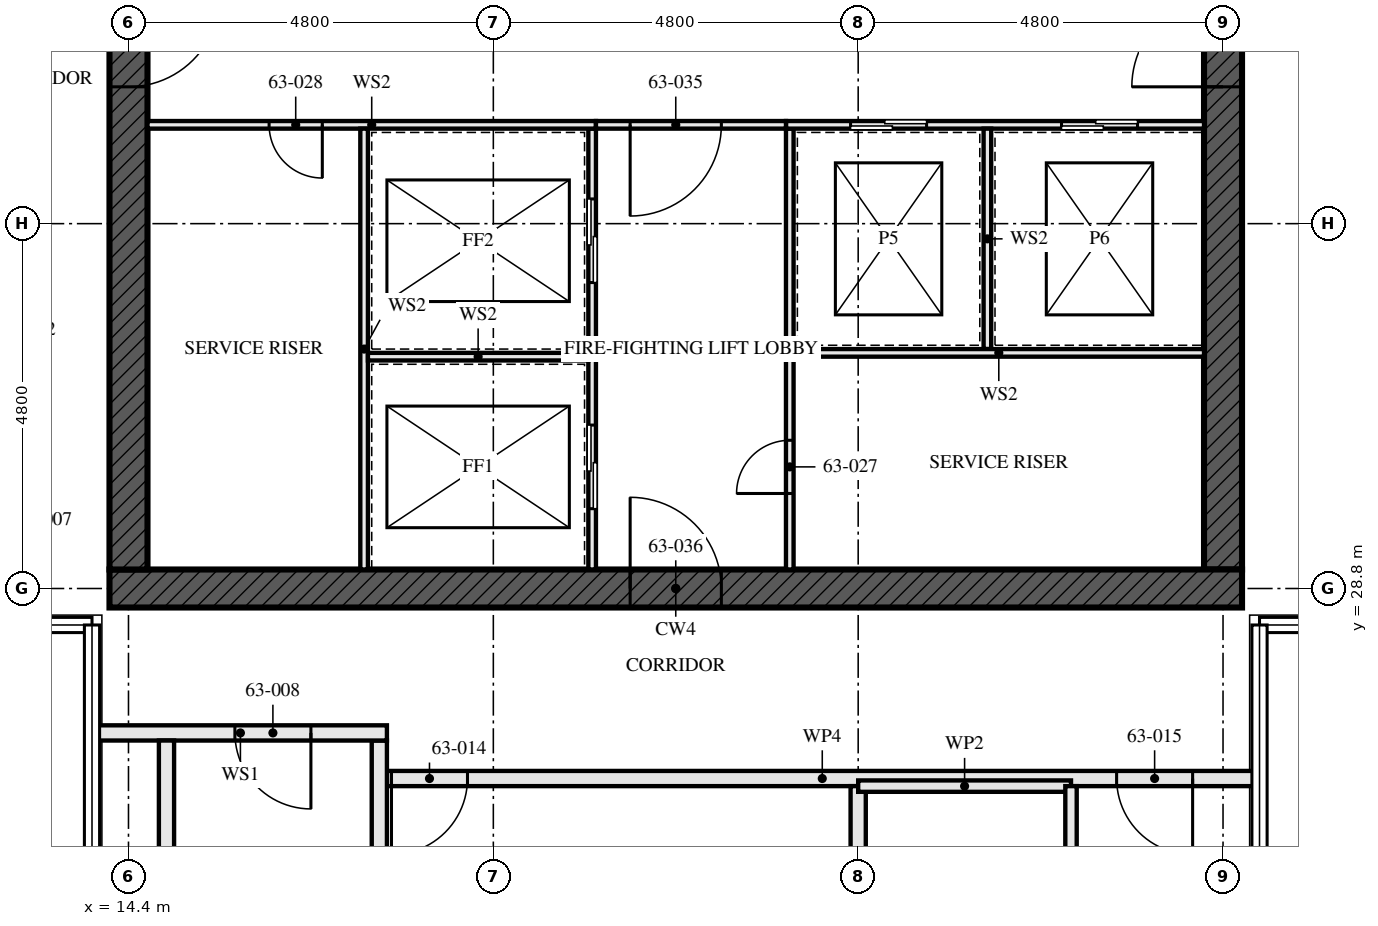
"""IFC4 building model, lengths in metres.
Left out: names, types, materials, properties, quantities, classifications, styles, units other than length and angle.
Written with IfcOpenShell. Run it as: python <this file> out.ifc"""

import sys

from ifc_helpers import new_model, si_unit, direction, frame, frame_2d, origin, place, context, subcontext, project, spatial, rectangle, extrude, element, fill, save


model = new_model("IFC4")
c1 = context("Model", 3, precision=1e-05, world=origin(), true_north=direction((0.0, 1.0)))
c2 = subcontext(c1, "Body", "Model", "MODEL_VIEW")
j1 = project(units=[si_unit("LENGTHUNIT", "METRE"), si_unit("PLANEANGLEUNIT", "RADIAN")], contexts=[c1])
p1 = place(None, origin())
s1 = spatial("IfcSite", under=j1, at=p1, CompositionType="ELEMENT")
p2 = place(p1, origin())
s2 = spatial("IfcBuilding", under=s1, at=p2, CompositionType="ELEMENT")
p3 = place(p2, frame((0.0, 0.0, 229.5)))
s3 = spatial("IfcBuildingStorey", under=s2, at=p3, CompositionType="ELEMENT", Elevation=229.5)
p4 = place(p3, frame((14.15, 28.8, -0.17), z_axis=(0.0, 0.0, 1.0), x_axis=(1.0, 0.0, 0.0)))
e1 = element("IfcWall", 1, at=p4, inside=s3, PredefinedType="SHEAR", context=c2, shape_type="SweptSolid", body=[
    extrude(rectangle(XDim=14.9, YDim=0.5, at=frame_2d((7.45, 0.0))), origin(), (0.0, 0.0, 1.0), 3.5),
])
p5 = place(p4, frame((6.85, 0.0, 0.17)))
e2 = element("IfcOpeningElement", 2, at=p5, cuts=e1, PredefinedType="OPENING", context=c2, shape_type="SweptSolid", body=[
    extrude(rectangle(XDim=1.2, YDim=2.1, at=frame_2d((0.6, 1.05))), frame((0.0, 0.26, 0.0), z_axis=(0.0, -1.0, 0.0), x_axis=(1.0, 0.0, 0.0)), (0.0, 0.0, 1.0), 0.521),
])
p6 = place(p3, frame((14.4, 42.95, -0.17), z_axis=(0.0, 0.0, 1.0), x_axis=(0.0, -1.0, 0.0)))
e3 = element("IfcWall", 3, at=p6, inside=s3, PredefinedType="SHEAR", context=c2, shape_type="SweptSolid", body=[
    extrude(rectangle(XDim=13.9, YDim=0.5, at=frame_2d((6.95, 0.0))), origin(), (0.0, 0.0, 1.0), 3.5),
])
p7 = place(p6, frame((6.35, 0.0, 0.17)))
e4 = element("IfcOpeningElement", 4, at=p7, cuts=e3, PredefinedType="OPENING", context=c2, shape_type="SweptSolid", body=[
    extrude(rectangle(XDim=1.2, YDim=2.1, at=frame_2d((0.6, 1.05))), frame((0.0, 0.26, 0.0), z_axis=(0.0, -1.0, 0.0), x_axis=(1.0, 0.0, 0.0)), (0.0, 0.0, 1.0), 0.521),
])
p8 = place(p3, frame((28.8, 29.05, -0.17), z_axis=(0.0, 0.0, 1.0), x_axis=(0.0, 1.0, 0.0)))
e5 = element("IfcWall", 5, at=p8, inside=s3, PredefinedType="SHEAR", context=c2, shape_type="SweptSolid", body=[
    extrude(rectangle(XDim=13.9, YDim=0.5, at=frame_2d((6.95, 0.0))), origin(), (0.0, 0.0, 1.0), 3.5),
])
p9 = place(p8, frame((6.35, 0.0, 0.17)))
e6 = element("IfcOpeningElement", 6, at=p9, cuts=e5, PredefinedType="OPENING", context=c2, shape_type="SweptSolid", body=[
    extrude(rectangle(XDim=1.2, YDim=2.1, at=frame_2d((0.6, 1.05))), frame((0.0, 0.26, 0.0), z_axis=(0.0, -1.0, 0.0), x_axis=(1.0, 0.0, 0.0)), (0.0, 0.0, 1.0), 0.521),
])
for number, where, z_axis, x_axis in (
    (7, (14.9, 22.1, 0.0), (0.0, 0.0, 1.0), (0.0, 1.0, 0.0)),
    (8, (17.7, 22.1, 0.0), (0.0, 0.0, 1.0), (0.0, 1.0, 0.0)),
):
    element("IfcWall", number, at=place(p3, frame(where, z_axis=z_axis, x_axis=x_axis)), inside=s3, PredefinedType="SOLIDWALL", context=c2, shape_type="SweptSolid", body=[
        extrude(rectangle(XDim=4.7, YDim=0.2, at=frame_2d((2.35, 0.0))), origin(), (0.0, 0.0, 1.0), 2.99),
    ])
p10 = place(p3, frame((13.945, 26.9, 0.0), z_axis=(0.0, 0.0, 1.0), x_axis=(1.0, 0.0, 0.0)))
e9 = element("IfcWall", 9, at=p10, inside=s3, PredefinedType="SOLIDWALL", context=c2, shape_type="SweptSolid", body=[
    extrude(rectangle(XDim=3.855, YDim=0.2, at=frame_2d((1.927, 0.0))), origin(), (0.0, 0.0, 1.0), 2.32),
])
p11 = place(p10, frame((1.855, 0.0, 0.0)))
e10 = element("IfcOpeningElement", 10, at=p11, cuts=e9, PredefinedType="OPENING", context=c2, shape_type="SweptSolid", body=[
    extrude(rectangle(XDim=1.0, YDim=2.1, at=frame_2d((0.5, 1.05))), frame((0.0, 0.111, 0.0), z_axis=(0.0, -1.0, 0.0), x_axis=(1.0, 0.0, 0.0)), (0.0, 0.0, 1.0), 0.221),
])
p12 = place(p3, frame((24.0, 19.52, 0.0), z_axis=(0.0, 0.0, 1.0), x_axis=(0.0, 1.0, 0.0)))
e11 = element("IfcWall", 11, at=p12, inside=s3, PredefinedType="PARTITIONING", context=c2, shape_type="SweptSolid", body=[
    extrude(rectangle(XDim=6.68, YDim=0.2, at=frame_2d((3.34, 0.0))), origin(), (0.0, 0.0, 1.0), 2.55),
])
p13 = place(p3, frame((26.8, 23.2, 0.0), z_axis=(0.0, 0.0, 1.0), x_axis=(0.0, 1.0, 0.0)))
e12 = element("IfcWall", 12, at=p13, inside=s3, PredefinedType="PARTITIONING", context=c2, shape_type="SweptSolid", body=[
    extrude(rectangle(XDim=3.0, YDim=0.15, at=frame_2d((1.5, 0.0))), origin(), (0.0, 0.0, 1.0), 2.55),
])
p14 = place(p13, frame((1.05, 0.0, 0.0)))
e13 = element("IfcOpeningElement", 13, at=p14, cuts=e12, PredefinedType="OPENING", context=c2, shape_type="SweptSolid", body=[
    extrude(rectangle(XDim=0.9, YDim=2.1, at=frame_2d((0.45, 1.05))), frame((0.0, 0.085, 0.0), z_axis=(0.0, -1.0, 0.0), x_axis=(1.0, 0.0, 0.0)), (0.0, 0.0, 1.0), 0.171),
])
p15 = place(p3, frame((24.0, 26.2, 0.0), z_axis=(0.0, 0.0, 1.0), x_axis=(1.0, 0.0, 0.0)))
e14 = element("IfcWall", 14, at=p15, inside=s3, PredefinedType="PARTITIONING", context=c2, shape_type="SweptSolid", body=[
    extrude(rectangle(XDim=2.8, YDim=0.15, at=frame_2d((1.4, 0.0))), origin(), (0.0, 0.0, 1.0), 3.33),
])
p16 = place(p3, frame((17.8, 26.3, 0.0), z_axis=(0.0, 0.0, 1.0), x_axis=(1.0, 0.0, 0.0)))
e15 = element("IfcWall", 15, at=p16, inside=s3, PredefinedType="PARTITIONING", context=c2, shape_type="SweptSolid", body=[
    extrude(rectangle(XDim=11.455, YDim=0.2, at=frame_2d((5.728, 0.0))), origin(), (0.0, 0.0, 1.0), 2.32),
])
p17 = place(p16, frame((0.06, 0.0, 0.0)))
e16 = element("IfcOpeningElement", 16, at=p17, cuts=e15, PredefinedType="OPENING", context=c2, shape_type="SweptSolid", body=[
    extrude(rectangle(XDim=1.0, YDim=2.1, at=frame_2d((0.5, 1.05))), frame((0.0, 0.111, 0.0), z_axis=(0.0, -1.0, 0.0), x_axis=(1.0, 0.0, 0.0)), (0.0, 0.0, 1.0), 0.221),
])
p18 = place(p16, frame((9.6, 0.0, 0.0)))
e17 = element("IfcOpeningElement", 17, at=p18, cuts=e15, PredefinedType="OPENING", context=c2, shape_type="SweptSolid", body=[
    extrude(rectangle(XDim=1.0, YDim=2.1, at=frame_2d((0.5, 1.05))), frame((0.0, 0.111, 0.0), z_axis=(0.0, -1.0, 0.0), x_axis=(1.0, 0.0, 0.0)), (0.0, 0.0, 1.0), 0.221),
])
p19 = place(p3, frame((20.5, 29.05, 0.0), z_axis=(0.0, 0.0, 1.0), x_axis=(0.0, 1.0, 0.0)))
e18 = element("IfcWall", 18, at=p19, inside=s3, PredefinedType="SOLIDWALL", context=c2, shape_type="SweptSolid", body=[
    extrude(rectangle(XDim=5.8, YDim=0.1, at=frame_2d((2.9, 0.0))), origin(), (0.0, 0.0, 1.0), 3.33),
])
p20 = place(p19, frame((0.8, 0.0, 0.0)))
e19 = element("IfcOpeningElement", 19, at=p20, cuts=e18, PredefinedType="OPENING", context=c2, shape_type="SweptSolid", body=[
    extrude(rectangle(XDim=1.1, YDim=2.3, at=frame_2d((0.55, 1.15))), frame((0.0, 0.061, 0.0), z_axis=(0.0, -1.0, 0.0), x_axis=(1.0, 0.0, 0.0)), (0.0, 0.0, 1.0), 0.121),
])
p21 = place(p19, frame((3.775, 0.0, 0.0)))
e20 = element("IfcOpeningElement", 20, at=p21, cuts=e18, PredefinedType="OPENING", context=c2, shape_type="SweptSolid", body=[
    extrude(rectangle(XDim=1.1, YDim=2.3, at=frame_2d((0.55, 1.15))), frame((0.0, 0.061, 0.0), z_axis=(0.0, -1.0, 0.0), x_axis=(1.0, 0.0, 0.0)), (0.0, 0.0, 1.0), 0.121),
])
p22 = place(p3, frame((23.1, 29.05, 0.0), z_axis=(0.0, 0.0, 1.0), x_axis=(0.0, 1.0, 0.0)))
e21 = element("IfcWall", 21, at=p22, inside=s3, PredefinedType="SOLIDWALL", context=c2, shape_type="SweptSolid", body=[
    extrude(rectangle(XDim=5.8, YDim=0.1, at=frame_2d((2.9, 0.0))), origin(), (0.0, 0.0, 1.0), 3.33),
])
p23 = place(p22, frame((1.0, 0.0, 0.0)))
e22 = element("IfcOpeningElement", 22, at=p23, cuts=e21, PredefinedType="OPENING", context=c2, shape_type="SweptSolid", body=[
    extrude(rectangle(XDim=0.7, YDim=2.1, at=frame_2d((0.35, 1.05))), frame((0.0, 0.061, 0.0), z_axis=(0.0, -1.0, 0.0), x_axis=(1.0, 0.0, 0.0)), (0.0, 0.0, 1.0), 0.121),
])
p24 = place(p3, frame((14.65, 34.9, 0.0), z_axis=(0.0, 0.0, 1.0), x_axis=(1.0, 0.0, 0.0)))
e23 = element("IfcWall", 23, at=p24, inside=s3, PredefinedType="SOLIDWALL", context=c2, shape_type="SweptSolid", body=[
    extrude(rectangle(XDim=5.9, YDim=0.1, at=frame_2d((2.95, 0.0))), origin(), (0.0, 0.0, 1.0), 3.33),
])
p25 = place(p24, frame((1.6, 0.0, 0.0)))
e24 = element("IfcOpeningElement", 24, at=p25, cuts=e23, PredefinedType="OPENING", context=c2, shape_type="SweptSolid", body=[
    extrude(rectangle(XDim=0.7, YDim=2.1, at=frame_2d((0.35, 1.05))), frame((0.0, 0.061, 0.0), z_axis=(0.0, -1.0, 0.0), x_axis=(1.0, 0.0, 0.0)), (0.0, 0.0, 1.0), 0.121),
])
p26 = place(p3, frame((23.05, 34.9, 0.0), z_axis=(0.0, 0.0, 1.0), x_axis=(1.0, 0.0, 0.0)))
e25 = element("IfcWall", 25, at=p26, inside=s3, PredefinedType="SOLIDWALL", context=c2, shape_type="SweptSolid", body=[
    extrude(rectangle(XDim=5.5, YDim=0.1, at=frame_2d((2.75, 0.0))), origin(), (0.0, 0.0, 1.0), 3.33),
])
p27 = place(p26, frame((0.85, 0.0, 0.0)))
e26 = element("IfcOpeningElement", 26, at=p27, cuts=e25, PredefinedType="OPENING", context=c2, shape_type="SweptSolid", body=[
    extrude(rectangle(XDim=1.0, YDim=2.1, at=frame_2d((0.5, 1.05))), frame((0.0, 0.061, 0.0), z_axis=(0.0, -1.0, 0.0), x_axis=(1.0, 0.0, 0.0)), (0.0, 0.0, 1.0), 0.121),
])
p28 = place(p26, frame((3.625, 0.0, 0.0)))
e27 = element("IfcOpeningElement", 27, at=p28, cuts=e25, PredefinedType="OPENING", context=c2, shape_type="SweptSolid", body=[
    extrude(rectangle(XDim=1.0, YDim=2.1, at=frame_2d((0.5, 1.05))), frame((0.0, 0.061, 0.0), z_axis=(0.0, -1.0, 0.0), x_axis=(1.0, 0.0, 0.0)), (0.0, 0.0, 1.0), 0.121),
])
p29 = place(p3, frame((20.55, 34.9, 0.0), z_axis=(0.0, 0.0, 1.0), x_axis=(1.0, 0.0, 0.0)))
e28 = element("IfcWall", 28, at=p29, inside=s3, PredefinedType="SOLIDWALL", context=c2, shape_type="SweptSolid", body=[
    extrude(rectangle(XDim=2.5, YDim=0.1, at=frame_2d((1.25, 0.0))), origin(), (0.0, 0.0, 1.0), 3.33),
])
p30 = place(p29, frame((0.45, 0.0, 0.0)))
e29 = element("IfcOpeningElement", 29, at=p30, cuts=e28, PredefinedType="OPENING", context=c2, shape_type="SweptSolid", body=[
    extrude(rectangle(XDim=1.2, YDim=2.1, at=frame_2d((0.6, 1.05))), frame((0.0, 0.061, 0.0), z_axis=(0.0, -1.0, 0.0), x_axis=(1.0, 0.0, 0.0)), (0.0, 0.0, 1.0), 0.121),
])
p31 = place(p3, frame((17.5, 29.05, 0.0), z_axis=(0.0, 0.0, 1.0), x_axis=(0.0, 1.0, 0.0)))
e30 = element("IfcWall", 30, at=p31, inside=s3, PredefinedType="SOLIDWALL", context=c2, shape_type="SweptSolid", body=[
    extrude(rectangle(XDim=5.8, YDim=0.1, at=frame_2d((2.9, 0.0))), origin(), (0.0, 0.0, 1.0), 3.33),
])
p32 = place(p3, frame((17.55, 31.85, 0.0), z_axis=(0.0, 0.0, 1.0), x_axis=(1.0, 0.0, 0.0)))
e31 = element("IfcWall", 31, at=p32, inside=s3, PredefinedType="SOLIDWALL", context=c2, shape_type="SweptSolid", body=[
    extrude(rectangle(XDim=2.9, YDim=0.1, at=frame_2d((1.45, 0.0))), origin(), (0.0, 0.0, 1.0), 3.33),
])
p33 = place(p3, frame((25.7, 31.95, 0.0), z_axis=(0.0, 0.0, 1.0), x_axis=(0.0, 1.0, 0.0)))
e32 = element("IfcWall", 32, at=p33, inside=s3, PredefinedType="SOLIDWALL", context=c2, shape_type="SweptSolid", body=[
    extrude(rectangle(XDim=2.9, YDim=0.1, at=frame_2d((1.45, 0.0))), origin(), (0.0, 0.0, 1.0), 3.33),
])
p34 = place(p3, frame((23.15, 31.9, 0.0), z_axis=(0.0, 0.0, 1.0), x_axis=(1.0, 0.0, 0.0)))
e33 = element("IfcWall", 33, at=p34, inside=s3, PredefinedType="SOLIDWALL", context=c2, shape_type="SweptSolid", body=[
    extrude(rectangle(XDim=5.4, YDim=0.1, at=frame_2d((2.7, 0.0))), origin(), (0.0, 0.0, 1.0), 3.33),
])
p35 = place(p11, frame((1.0, 0.0, 0.0), z_axis=(0.0, 0.0, 1.0), x_axis=(-1.0, 0.0, 0.0)))
e34 = element("IfcDoor", 34, at=p35, inside=s3, OperationType="SINGLE_SWING_RIGHT", PredefinedType="DOOR", context=c2, shape_type="SweptSolid", body=[
    extrude(rectangle(XDim=1.0, YDim=2.1, at=frame_2d((0.5, 1.05))), frame((0.0, 0.032, 0.0), z_axis=(0.0, -1.0, 0.0), x_axis=(1.0, 0.0, 0.0)), (0.0, 0.0, 1.0), 0.064),
])
fill(e10, e34)
p36 = place(p17, frame((1.0, 0.0, 0.0), z_axis=(0.0, 0.0, 1.0), x_axis=(-1.0, 0.0, 0.0)))
e35 = element("IfcDoor", 35, at=p36, inside=s3, OperationType="SINGLE_SWING_LEFT", PredefinedType="DOOR", context=c2, shape_type="SweptSolid", body=[
    extrude(rectangle(XDim=1.0, YDim=2.1, at=frame_2d((0.5, 1.05))), frame((0.0, 0.027, 0.0), z_axis=(0.0, -1.0, 0.0), x_axis=(1.0, 0.0, 0.0)), (0.0, 0.0, 1.0), 0.054),
])
fill(e16, e35)
p37 = place(p18, frame((1.0, 0.0, 0.0), z_axis=(0.0, 0.0, 1.0), x_axis=(-1.0, 0.0, 0.0)))
e36 = element("IfcDoor", 36, at=p37, inside=s3, OperationType="SINGLE_SWING_RIGHT", PredefinedType="DOOR", context=c2, shape_type="SweptSolid", body=[
    extrude(rectangle(XDim=1.0, YDim=2.1, at=frame_2d((0.5, 1.05))), frame((0.0, 0.027, 0.0), z_axis=(0.0, -1.0, 0.0), x_axis=(1.0, 0.0, 0.0)), (0.0, 0.0, 1.0), 0.054),
])
fill(e17, e36)
p38 = place(p20, origin())
e37 = element("IfcDoor", 37, at=p38, inside=s3, OperationType="SLIDING_TO_LEFT", PredefinedType="DOOR", context=c2, shape_type="SweptSolid", body=[
    extrude(rectangle(XDim=1.1, YDim=2.3, at=frame_2d((0.55, 1.15))), frame((0.0, 0.05, 0.0), z_axis=(0.0, -1.0, 0.0), x_axis=(1.0, 0.0, 0.0)), (0.0, 0.0, 1.0), 0.1),
])
fill(e19, e37)
p39 = place(p21, origin())
e38 = element("IfcDoor", 38, at=p39, inside=s3, OperationType="SLIDING_TO_LEFT", PredefinedType="DOOR", context=c2, shape_type="SweptSolid", body=[
    extrude(rectangle(XDim=1.1, YDim=2.3, at=frame_2d((0.55, 1.15))), frame((0.0, 0.05, 0.0), z_axis=(0.0, -1.0, 0.0), x_axis=(1.0, 0.0, 0.0)), (0.0, 0.0, 1.0), 0.1),
])
fill(e20, e38)
p40 = place(p23, origin())
e39 = element("IfcDoor", 39, at=p40, inside=s3, OperationType="SINGLE_SWING_RIGHT", PredefinedType="DOOR", context=c2, shape_type="SweptSolid", body=[
    extrude(rectangle(XDim=0.7, YDim=2.1, at=frame_2d((0.35, 1.05))), frame((0.0, 0.027, 0.0), z_axis=(0.0, -1.0, 0.0), x_axis=(1.0, 0.0, 0.0)), (0.0, 0.0, 1.0), 0.054),
])
fill(e22, e39)
p41 = place(p25, frame((0.7, 0.0, 0.0), z_axis=(0.0, 0.0, 1.0), x_axis=(-1.0, 0.0, 0.0)))
e40 = element("IfcDoor", 40, at=p41, inside=s3, OperationType="SINGLE_SWING_RIGHT", PredefinedType="DOOR", context=c2, shape_type="SweptSolid", body=[
    extrude(rectangle(XDim=0.7, YDim=2.1, at=frame_2d((0.35, 1.05))), frame((0.0, 0.027, 0.0), z_axis=(0.0, -1.0, 0.0), x_axis=(1.0, 0.0, 0.0)), (0.0, 0.0, 1.0), 0.054),
])
fill(e24, e40)
p42 = place(p27, origin())
e41 = element("IfcDoor", 41, at=p42, inside=s3, OperationType="SLIDING_TO_LEFT", PredefinedType="DOOR", context=c2, shape_type="SweptSolid", body=[
    extrude(rectangle(XDim=1.0, YDim=2.1, at=frame_2d((0.5, 1.05))), frame((0.0, 0.05, 0.0), z_axis=(0.0, -1.0, 0.0), x_axis=(1.0, 0.0, 0.0)), (0.0, 0.0, 1.0), 0.1),
])
fill(e26, e41)
p43 = place(p28, origin())
e42 = element("IfcDoor", 42, at=p43, inside=s3, OperationType="SLIDING_TO_LEFT", PredefinedType="DOOR", context=c2, shape_type="SweptSolid", body=[
    extrude(rectangle(XDim=1.0, YDim=2.1, at=frame_2d((0.5, 1.05))), frame((0.0, 0.05, 0.0), z_axis=(0.0, -1.0, 0.0), x_axis=(1.0, 0.0, 0.0)), (0.0, 0.0, 1.0), 0.1),
])
fill(e27, e42)
p44 = place(p30, frame((1.2, 0.0, 0.0), z_axis=(0.0, 0.0, 1.0), x_axis=(-1.0, 0.0, 0.0)))
e43 = element("IfcDoor", 43, at=p44, inside=s3, OperationType="SINGLE_SWING_LEFT", PredefinedType="DOOR", context=c2, shape_type="SweptSolid", body=[
    extrude(rectangle(XDim=1.2, YDim=2.1, at=frame_2d((0.6, 1.05))), frame((0.0, 0.027, 0.0), z_axis=(0.0, -1.0, 0.0), x_axis=(1.0, 0.0, 0.0)), (0.0, 0.0, 1.0), 0.054),
])
fill(e29, e43)
p45 = place(p5, origin())
e44 = element("IfcDoor", 44, at=p45, inside=s3, OperationType="SINGLE_SWING_LEFT", PredefinedType="DOOR", context=c2, shape_type="SweptSolid", body=[
    extrude(rectangle(XDim=1.2, YDim=2.1, at=frame_2d((0.6, 1.05))), frame((0.0, 0.027, 0.0), z_axis=(0.0, -1.0, 0.0), x_axis=(1.0, 0.0, 0.0)), (0.0, 0.0, 1.0), 0.054),
])
fill(e2, e44)
p46 = place(p7, origin())
e45 = element("IfcDoor", 45, at=p46, inside=s3, OperationType="SINGLE_SWING_LEFT", PredefinedType="DOOR", context=c2, shape_type="SweptSolid", body=[
    extrude(rectangle(XDim=1.2, YDim=2.1, at=frame_2d((0.6, 1.05))), frame((0.0, 0.027, 0.0), z_axis=(0.0, -1.0, 0.0), x_axis=(1.0, 0.0, 0.0)), (0.0, 0.0, 1.0), 0.054),
])
fill(e4, e45)
p47 = place(p9, origin())
e46 = element("IfcDoor", 46, at=p47, inside=s3, OperationType="SINGLE_SWING_LEFT", PredefinedType="DOOR", context=c2, shape_type="SweptSolid", body=[
    extrude(rectangle(XDim=1.2, YDim=2.1, at=frame_2d((0.6, 1.05))), frame((0.0, 0.027, 0.0), z_axis=(0.0, -1.0, 0.0), x_axis=(1.0, 0.0, 0.0)), (0.0, 0.0, 1.0), 0.054),
])
fill(e6, e46)
save(model, sys.argv[1])
